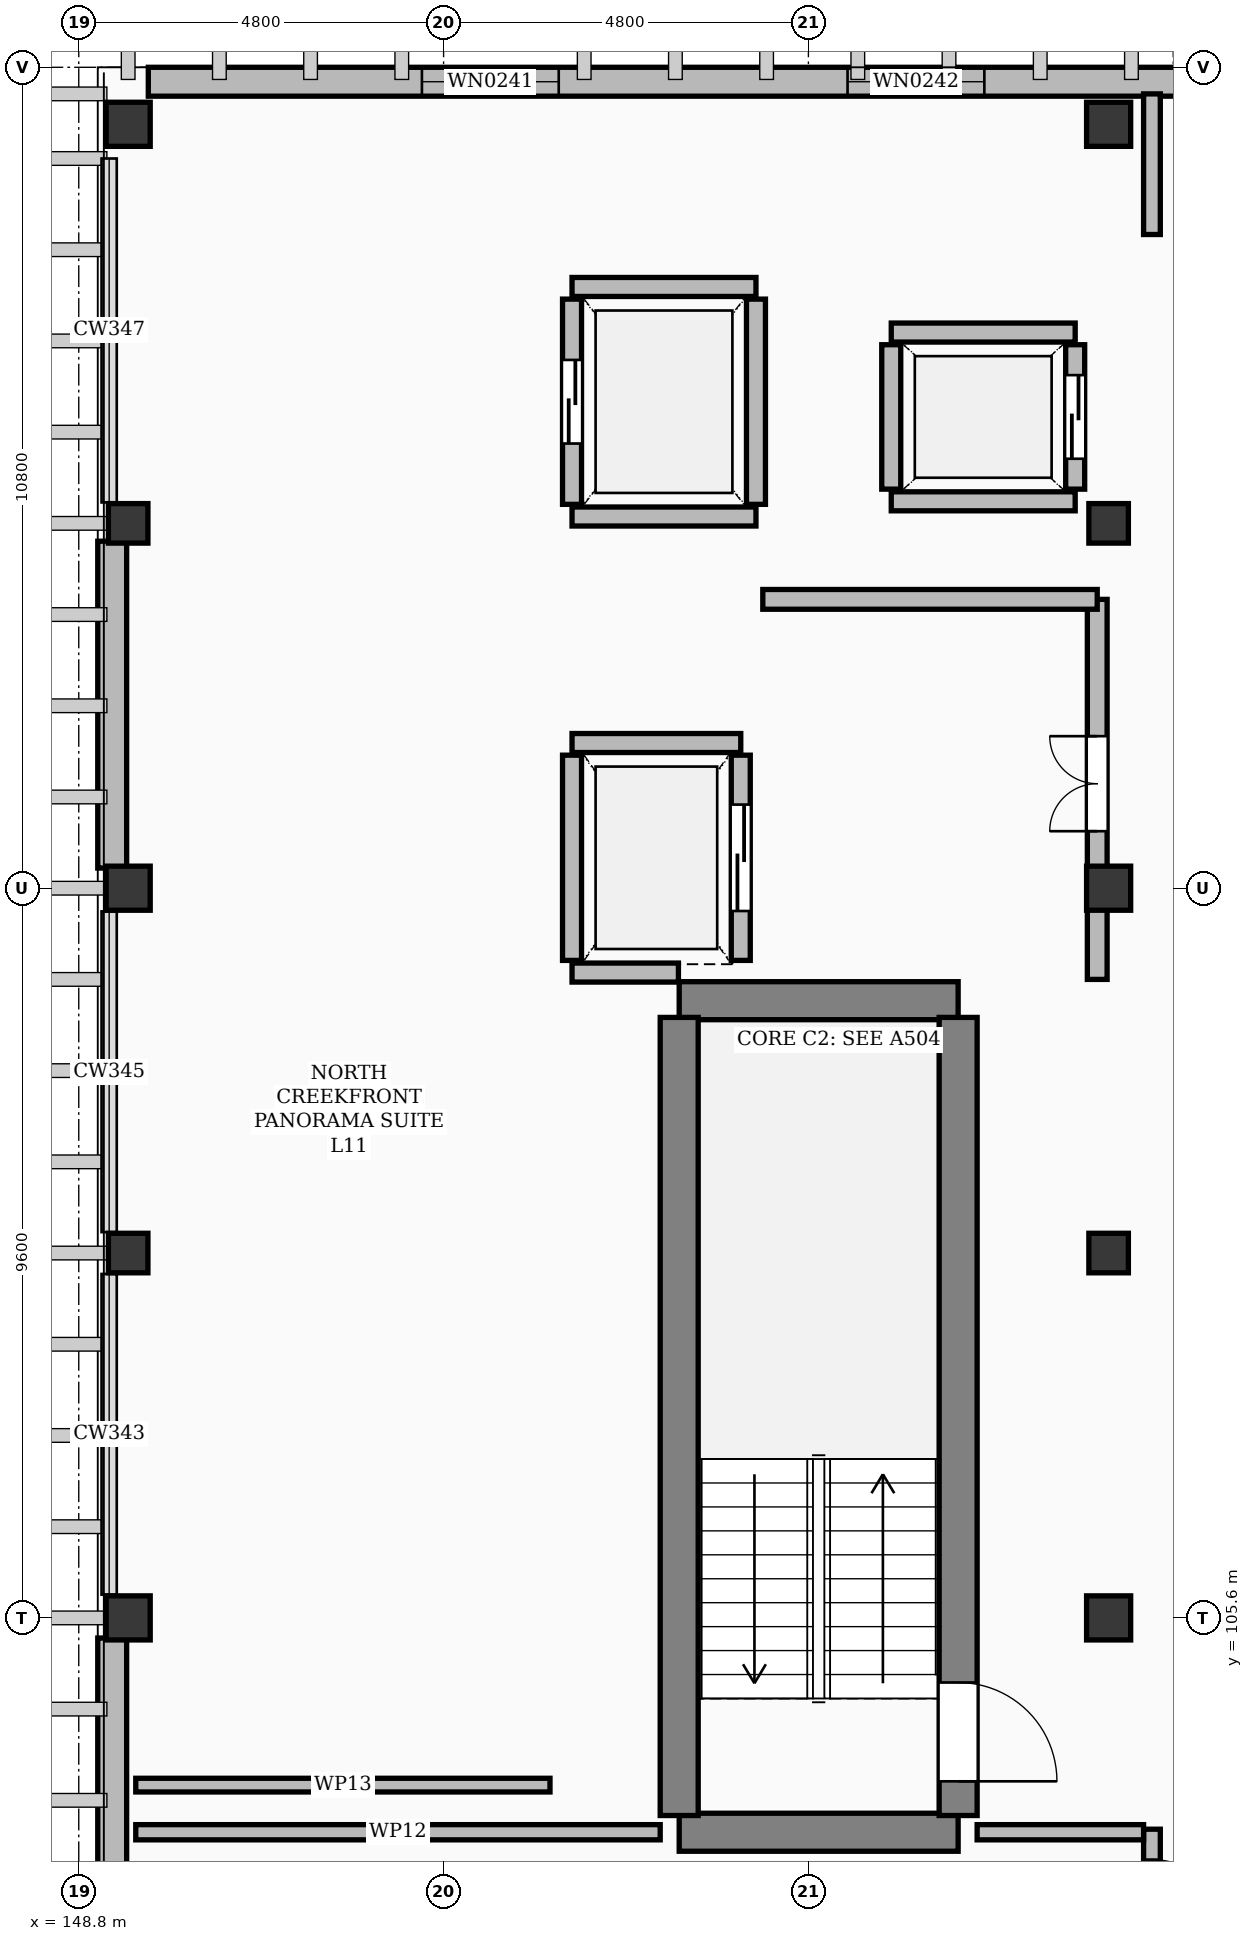
"""IFC4 building model, lengths in metres.
Left out: names, types, materials, properties, quantities, classifications, styles, units other than length and angle.
Written with IfcOpenShell. Run it as: python <this file> out.ifc"""

import sys

from ifc_helpers import new_model, si_unit, direction, frame, frame_2d, origin, origin_2d, place, context, subcontext, project, spatial, rectangle, extrude, element, fill, save


model = new_model("IFC4")
c1 = context("Model", 3, precision=1e-05, world=origin(), true_north=direction((0.0, 1.0)))
c2 = subcontext(c1, "Body", "Model", "MODEL_VIEW")
j1 = project(units=[si_unit("LENGTHUNIT", "METRE"), si_unit("PLANEANGLEUNIT", "RADIAN")], contexts=[c1])
p1 = place(None, origin())
s1 = spatial("IfcSite", under=j1, at=p1, CompositionType="ELEMENT")
p2 = place(p1, origin())
s2 = spatial("IfcBuilding", under=s1, at=p2, CompositionType="ELEMENT")
p3 = place(p2, frame((0.0, 0.0, 46.5)))
s3 = spatial("IfcBuildingStorey", under=s2, at=p3, CompositionType="ELEMENT", Elevation=46.5)
for number, where, z_axis, x_axis in (
    (1, (149.45, 105.6, 0.0), (0.0, 0.0, 1.0), (1.0, 0.0, 0.0)),
    (2, (149.45, 115.2, 0.0), (0.0, 0.0, 1.0), (1.0, 0.0, 0.0)),
    (3, (149.45, 125.25, 0.0), (0.0, 0.0, 1.0), (1.0, 0.0, 0.0)),
    (4, (162.35, 105.6, 0.0), (0.0, 0.0, 1.0), (1.0, 0.0, 0.0)),
    (5, (162.35, 115.2, 0.0), (0.0, 0.0, 1.0), (1.0, 0.0, 0.0)),
    (6, (162.35, 125.25, 0.0), (0.0, 0.0, 1.0), (1.0, 0.0, 0.0)),
):
    element("IfcColumn", number, at=place(p3, frame(where, z_axis=z_axis, x_axis=x_axis)), inside=s3, PredefinedType="COLUMN", context=c2, shape_type="SweptSolid", body=[
        extrude(rectangle(XDim=0.58, YDim=0.58, at=origin_2d()), origin(), (0.0, 0.0, 1.0), 3.9),
    ])
for number, where, z_axis, x_axis in (
    (7, (149.45, 110.4, 0.0), (0.0, 0.0, 1.0), (1.0, 0.0, 0.0)),
    (8, (149.45, 120.0, 0.0), (0.0, 0.0, 1.0), (1.0, 0.0, 0.0)),
    (9, (162.35, 110.4, 0.0), (0.0, 0.0, 1.0), (1.0, 0.0, 0.0)),
    (10, (162.35, 120.0, 0.0), (0.0, 0.0, 1.0), (1.0, 0.0, 0.0)),
):
    element("IfcColumn", number, at=place(p3, frame(where, z_axis=z_axis, x_axis=x_axis)), inside=s3, PredefinedType="COLUMN", context=c2, shape_type="SweptSolid", body=[
        extrude(rectangle(XDim=0.52, YDim=0.52, at=origin_2d()), origin(), (0.0, 0.0, 1.0), 3.9),
    ])
p4 = place(p3, frame((149.715, 125.81, 0.0), z_axis=(0.0, 0.0, 1.0), x_axis=(1.0, 0.0, 0.0)))
e11 = element("IfcWall", 11, at=p4, inside=s3, PredefinedType="SOLIDWALL", context=c2, shape_type="SweptSolid", body=[
    extrude(rectangle(XDim=29.37, YDim=0.38, at=frame_2d((14.685, 0.0))), origin(), (0.0, 0.0, 1.0), 3.68),
])
p5 = place(p4, frame((3.6, 0.0, 0.55)))
e12 = element("IfcOpeningElement", 12, at=p5, cuts=e11, PredefinedType="OPENING", context=c2, shape_type="SweptSolid", body=[
    extrude(rectangle(XDim=1.8, YDim=1.76, at=frame_2d((0.9, 0.88))), frame((0.0, 0.202, 0.0), z_axis=(0.0, -1.0, 0.0), x_axis=(1.0, 0.0, 0.0)), (0.0, 0.0, 1.0), 0.404),
])
p6 = place(p4, frame((9.2, 0.0, 0.55)))
e13 = element("IfcOpeningElement", 13, at=p6, cuts=e11, PredefinedType="OPENING", context=c2, shape_type="SweptSolid", body=[
    extrude(rectangle(XDim=1.8, YDim=1.76, at=frame_2d((0.9, 0.88))), frame((0.0, 0.202, 0.0), z_axis=(0.0, -1.0, 0.0), x_axis=(1.0, 0.0, 0.0)), (0.0, 0.0, 1.0), 0.404),
])
p7 = place(p4, frame((19.6, 0.0, 0.55)))
e14 = element("IfcOpeningElement", 14, at=p7, cuts=e11, PredefinedType="OPENING", context=c2, shape_type="SweptSolid", body=[
    extrude(rectangle(XDim=1.8, YDim=1.76, at=frame_2d((0.9, 0.88))), frame((0.0, 0.202, 0.0), z_axis=(0.0, -1.0, 0.0), x_axis=(1.0, 0.0, 0.0)), (0.0, 0.0, 1.0), 0.404),
])
p8 = place(p4, frame((25.2, 0.0, 0.55)))
e15 = element("IfcOpeningElement", 15, at=p8, cuts=e11, PredefinedType="OPENING", context=c2, shape_type="SweptSolid", body=[
    extrude(rectangle(XDim=1.8, YDim=1.76, at=frame_2d((0.9, 0.88))), frame((0.0, 0.202, 0.0), z_axis=(0.0, -1.0, 0.0), x_axis=(1.0, 0.0, 0.0)), (0.0, 0.0, 1.0), 0.404),
])
p9 = place(p3, frame((149.24, 101.035, 0.0), z_axis=(0.0, 0.0, 1.0), x_axis=(0.0, 1.0, 0.0)))
e16 = element("IfcWall", 16, at=p9, inside=s3, PredefinedType="SOLIDWALL", context=c2, shape_type="SweptSolid", body=[
    extrude(rectangle(XDim=4.3, YDim=0.38, at=frame_2d((2.15, 0.0))), origin(), (0.0, 0.0, 1.0), 3.072),
])
p10 = place(p3, frame((149.24, 115.465, 0.0), z_axis=(0.0, 0.0, 1.0), x_axis=(0.0, 1.0, 0.0)))
e17 = element("IfcWall", 17, at=p10, inside=s3, PredefinedType="SOLIDWALL", context=c2, shape_type="SweptSolid", body=[
    extrude(rectangle(XDim=4.3, YDim=0.38, at=frame_2d((2.15, 0.0))), origin(), (0.0, 0.0, 1.0), 3.072),
])
for number, where, z_axis, x_axis in (
    (18, (156.7, 102.78, 0.0), (0.0, 0.0, 1.0), (1.0, 0.0, 0.0)),
    (19, (156.7, 113.72, 0.0), (0.0, 0.0, 1.0), (1.0, 0.0, 0.0)),
):
    element("IfcWall", number, at=place(p3, frame(where, z_axis=z_axis, x_axis=x_axis)), inside=s3, PredefinedType="SHEAR", context=c2, shape_type="SweptSolid", body=[
        extrude(rectangle(XDim=3.67, YDim=0.5, at=frame_2d((1.835, 0.0))), origin(), (0.0, 0.0, 1.0), 3.68),
    ])
p11 = place(p3, frame((156.7, 103.0, 0.0), z_axis=(0.0, 0.0, 1.0), x_axis=(0.0, 1.0, 0.0)))
e20 = element("IfcWall", 20, at=p11, inside=s3, PredefinedType="SHEAR", context=c2, shape_type="SweptSolid", body=[
    extrude(rectangle(XDim=10.5, YDim=0.5, at=frame_2d((5.25, 0.0))), origin(), (0.0, 0.0, 1.0), 3.68),
])
p12 = place(p3, frame((160.37, 103.0, 0.0), z_axis=(0.0, 0.0, 1.0), x_axis=(0.0, 1.0, 0.0)))
e21 = element("IfcWall", 21, at=p12, inside=s3, PredefinedType="SHEAR", context=c2, shape_type="SweptSolid", body=[
    extrude(rectangle(XDim=10.5, YDim=0.5, at=frame_2d((5.25, 0.0))), origin(), (0.0, 0.0, 1.0), 3.68),
])
p13 = place(p12, frame((0.45, 0.0, 0.0)))
e22 = element("IfcOpeningElement", 22, at=p13, cuts=e21, PredefinedType="OPENING", context=c2, shape_type="SweptSolid", body=[
    extrude(rectangle(XDim=1.3, YDim=2.15, at=frame_2d((0.65, 1.075))), frame((0.0, 0.262, 0.0), z_axis=(0.0, -1.0, 0.0), x_axis=(1.0, 0.0, 0.0)), (0.0, 0.0, 1.0), 0.524),
])
p14 = place(p3, frame((155.29, 114.09, 0.0), z_axis=(0.0, 0.0, 1.0), x_axis=(1.0, 0.0, 0.0)))
e23 = element("IfcWall", 23, at=p14, inside=s3, PredefinedType="SOLIDWALL", context=c2, shape_type="SweptSolid", body=[
    extrude(rectangle(XDim=1.4, YDim=0.25, at=frame_2d((0.7, 0.0))), origin(), (0.0, 0.0, 1.0), 3.68),
])
p15 = place(p3, frame((155.29, 117.11, 0.0), z_axis=(0.0, 0.0, 1.0), x_axis=(1.0, 0.0, 0.0)))
e24 = element("IfcWall", 24, at=p15, inside=s3, PredefinedType="SOLIDWALL", context=c2, shape_type="SweptSolid", body=[
    extrude(rectangle(XDim=2.22, YDim=0.25, at=frame_2d((1.11, 0.0))), origin(), (0.0, 0.0, 1.0), 3.68),
])
p16 = place(p3, frame((155.29, 114.25, 0.0), z_axis=(0.0, 0.0, 1.0), x_axis=(0.0, 1.0, 0.0)))
e25 = element("IfcWall", 25, at=p16, inside=s3, PredefinedType="SOLIDWALL", context=c2, shape_type="SweptSolid", body=[
    extrude(rectangle(XDim=2.7, YDim=0.25, at=frame_2d((1.35, 0.0))), origin(), (0.0, 0.0, 1.0), 3.072),
])
p17 = place(p3, frame((157.51, 114.25, 0.0), z_axis=(0.0, 0.0, 1.0), x_axis=(0.0, 1.0, 0.0)))
e26 = element("IfcWall", 26, at=p17, inside=s3, PredefinedType="SOLIDWALL", context=c2, shape_type="SweptSolid", body=[
    extrude(rectangle(XDim=2.7, YDim=0.25, at=frame_2d((1.35, 0.0))), origin(), (0.0, 0.0, 1.0), 3.072),
])
p18 = place(p17, frame((0.65, 0.0, 0.0)))
e27 = element("IfcOpeningElement", 27, at=p18, cuts=e26, PredefinedType="OPENING", context=c2, shape_type="SweptSolid", body=[
    extrude(rectangle(XDim=1.4, YDim=2.3, at=frame_2d((0.7, 1.15))), frame((0.0, 0.137, 0.0), z_axis=(0.0, -1.0, 0.0), x_axis=(1.0, 0.0, 0.0)), (0.0, 0.0, 1.0), 0.274),
])
p19 = place(p3, frame((159.49, 120.29, 0.0), z_axis=(0.0, 0.0, 1.0), x_axis=(1.0, 0.0, 0.0)))
e28 = element("IfcWall", 28, at=p19, inside=s3, PredefinedType="SOLIDWALL", context=c2, shape_type="SweptSolid", body=[
    extrude(rectangle(XDim=2.42, YDim=0.25, at=frame_2d((1.21, 0.0))), origin(), (0.0, 0.0, 1.0), 3.072),
])
p20 = place(p3, frame((159.49, 122.51, 0.0), z_axis=(0.0, 0.0, 1.0), x_axis=(1.0, 0.0, 0.0)))
e29 = element("IfcWall", 29, at=p20, inside=s3, PredefinedType="SOLIDWALL", context=c2, shape_type="SweptSolid", body=[
    extrude(rectangle(XDim=2.42, YDim=0.25, at=frame_2d((1.21, 0.0))), origin(), (0.0, 0.0, 1.0), 3.68),
])
p21 = place(p3, frame((159.49, 120.45, 0.0), z_axis=(0.0, 0.0, 1.0), x_axis=(0.0, 1.0, 0.0)))
e30 = element("IfcWall", 30, at=p21, inside=s3, PredefinedType="SOLIDWALL", context=c2, shape_type="SweptSolid", body=[
    extrude(rectangle(XDim=1.9, YDim=0.25, at=frame_2d((0.95, 0.0))), origin(), (0.0, 0.0, 1.0), 3.68),
])
p22 = place(p3, frame((161.91, 120.45, 0.0), z_axis=(0.0, 0.0, 1.0), x_axis=(0.0, 1.0, 0.0)))
e31 = element("IfcWall", 31, at=p22, inside=s3, PredefinedType="SOLIDWALL", context=c2, shape_type="SweptSolid", body=[
    extrude(rectangle(XDim=1.9, YDim=0.25, at=frame_2d((0.95, 0.0))), origin(), (0.0, 0.0, 1.0), 3.68),
])
p23 = place(p22, frame((0.4, 0.0, 0.0)))
e32 = element("IfcOpeningElement", 32, at=p23, cuts=e31, PredefinedType="OPENING", context=c2, shape_type="SweptSolid", body=[
    extrude(rectangle(XDim=1.1, YDim=2.2, at=frame_2d((0.55, 1.1))), frame((0.0, 0.137, 0.0), z_axis=(0.0, -1.0, 0.0), x_axis=(1.0, 0.0, 0.0)), (0.0, 0.0, 1.0), 0.274),
])
p24 = place(p3, frame((155.29, 120.09, 0.0), z_axis=(0.0, 0.0, 1.0), x_axis=(1.0, 0.0, 0.0)))
e33 = element("IfcWall", 33, at=p24, inside=s3, PredefinedType="SOLIDWALL", context=c2, shape_type="SweptSolid", body=[
    extrude(rectangle(XDim=2.42, YDim=0.25, at=frame_2d((1.21, 0.0))), origin(), (0.0, 0.0, 1.0), 3.072),
])
p25 = place(p3, frame((155.29, 123.11, 0.0), z_axis=(0.0, 0.0, 1.0), x_axis=(1.0, 0.0, 0.0)))
e34 = element("IfcWall", 34, at=p25, inside=s3, PredefinedType="SOLIDWALL", context=c2, shape_type="SweptSolid", body=[
    extrude(rectangle(XDim=2.42, YDim=0.25, at=frame_2d((1.21, 0.0))), origin(), (0.0, 0.0, 1.0), 3.68),
])
p26 = place(p3, frame((155.29, 120.25, 0.0), z_axis=(0.0, 0.0, 1.0), x_axis=(0.0, 1.0, 0.0)))
e35 = element("IfcWall", 35, at=p26, inside=s3, PredefinedType="SOLIDWALL", context=c2, shape_type="SweptSolid", body=[
    extrude(rectangle(XDim=2.7, YDim=0.25, at=frame_2d((1.35, 0.0))), origin(), (0.0, 0.0, 1.0), 3.072),
])
p27 = place(p26, frame((0.8, 0.0, 0.0)))
e36 = element("IfcOpeningElement", 36, at=p27, cuts=e35, PredefinedType="OPENING", context=c2, shape_type="SweptSolid", body=[
    extrude(rectangle(XDim=1.1, YDim=2.2, at=frame_2d((0.55, 1.1))), frame((0.0, 0.137, 0.0), z_axis=(0.0, -1.0, 0.0), x_axis=(1.0, 0.0, 0.0)), (0.0, 0.0, 1.0), 0.274),
])
p28 = place(p3, frame((157.71, 120.25, 0.0), z_axis=(0.0, 0.0, 1.0), x_axis=(0.0, 1.0, 0.0)))
e37 = element("IfcWall", 37, at=p28, inside=s3, PredefinedType="SOLIDWALL", context=c2, shape_type="SweptSolid", body=[
    extrude(rectangle(XDim=2.7, YDim=0.25, at=frame_2d((1.35, 0.0))), origin(), (0.0, 0.0, 1.0), 3.072),
])
p29 = place(p3, frame((162.2, 114.0, 0.0), z_axis=(0.0, 0.0, 1.0), x_axis=(0.0, 1.0, 0.0)))
e38 = element("IfcWall", 38, at=p29, inside=s3, PredefinedType="SOLIDWALL", context=c2, shape_type="SweptSolid", body=[
    extrude(rectangle(XDim=5.0, YDim=0.26, at=frame_2d((2.5, 0.0))), origin(), (0.0, 0.0, 1.0), 3.072),
])
p30 = place(p29, frame((1.95, 0.0, 0.0)))
e39 = element("IfcOpeningElement", 39, at=p30, cuts=e38, PredefinedType="OPENING", context=c2, shape_type="SweptSolid", body=[
    extrude(rectangle(XDim=1.25, YDim=2.15, at=frame_2d((0.625, 1.075))), frame((0.0, 0.142, 0.0), z_axis=(0.0, -1.0, 0.0), x_axis=(1.0, 0.0, 0.0)), (0.0, 0.0, 1.0), 0.284),
])
p31 = place(p3, frame((157.8, 119.0, 0.0), z_axis=(0.0, 0.0, 1.0), x_axis=(1.0, 0.0, 0.0)))
e40 = element("IfcWall", 40, at=p31, inside=s3, PredefinedType="SOLIDWALL", context=c2, shape_type="SweptSolid", body=[
    extrude(rectangle(XDim=4.4, YDim=0.26, at=frame_2d((2.2, 0.0))), origin(), (0.0, 0.0, 1.0), 3.072),
])
p32 = place(p3, frame((162.92, 95.6, 0.0), z_axis=(0.0, 0.0, 1.0), x_axis=(0.0, 1.0, 0.0)))
e41 = element("IfcWall", 41, at=p32, inside=s3, PredefinedType="PARTITIONING", context=c2, shape_type="SweptSolid", body=[
    extrude(rectangle(XDim=7.22, YDim=0.22, at=frame_2d((3.61, 0.0))), origin(), (0.0, 0.0, 1.0), 3.072),
])
p33 = place(p32, frame((2.05, 0.0, 0.0)))
e42 = element("IfcOpeningElement", 42, at=p33, cuts=e41, PredefinedType="OPENING", context=c2, shape_type="SweptSolid", body=[
    extrude(rectangle(XDim=1.28, YDim=2.16, at=frame_2d((0.64, 1.08))), frame((0.0, 0.122, 0.0), z_axis=(0.0, -1.0, 0.0), x_axis=(1.0, 0.0, 0.0)), (0.0, 0.0, 1.0), 0.244),
])
p34 = place(p32, frame((5.8, 0.0, 0.0)))
e43 = element("IfcOpeningElement", 43, at=p34, cuts=e41, PredefinedType="OPENING", context=c2, shape_type="SweptSolid", body=[
    extrude(rectangle(XDim=1.02, YDim=2.2, at=frame_2d((0.51, 1.1))), frame((0.0, 0.122, 0.0), z_axis=(0.0, -1.0, 0.0), x_axis=(1.0, 0.0, 0.0)), (0.0, 0.0, 1.0), 0.244),
])
p35 = place(p3, frame((162.92, 123.8, 0.0), z_axis=(0.0, 0.0, 1.0), x_axis=(0.0, 1.0, 0.0)))
e44 = element("IfcWall", 44, at=p35, inside=s3, PredefinedType="PARTITIONING", context=c2, shape_type="SweptSolid", body=[
    extrude(rectangle(XDim=1.85, YDim=0.22, at=frame_2d((0.925, 0.0))), origin(), (0.0, 0.0, 1.0), 2.922),
])
p36 = place(p3, frame((149.55, 102.78, 0.0), z_axis=(0.0, 0.0, 1.0), x_axis=(1.0, 0.0, 0.0)))
e45 = element("IfcWall", 45, at=p36, inside=s3, PredefinedType="PARTITIONING", context=c2, shape_type="SweptSolid", body=[
    extrude(rectangle(XDim=6.9, YDim=0.2, at=frame_2d((3.45, 0.0))), origin(), (0.0, 0.0, 1.0), 3.68),
])
p37 = place(p3, frame((160.62, 102.78, 0.0), z_axis=(0.0, 0.0, 1.0), x_axis=(1.0, 0.0, 0.0)))
e46 = element("IfcWall", 46, at=p37, inside=s3, PredefinedType="PARTITIONING", context=c2, shape_type="SweptSolid", body=[
    extrude(rectangle(XDim=2.19, YDim=0.2, at=frame_2d((1.095, 0.0))), origin(), (0.0, 0.0, 1.0), 3.072),
])
p38 = place(p3, frame((149.55, 103.4, 0.0), z_axis=(0.0, 0.0, 1.0), x_axis=(1.0, 0.0, 0.0)))
e47 = element("IfcWall", 47, at=p38, inside=s3, PredefinedType="PARTITIONING", context=c2, shape_type="SweptSolid", body=[
    extrude(rectangle(XDim=5.45, YDim=0.18, at=frame_2d((2.725, 0.0))), origin(), (0.0, 0.0, 1.0), 3.68),
])
p39 = place(p5, origin())
e48 = element("IfcWindow", 48, at=p39, inside=s3, PartitioningType="SINGLE_PANEL", PredefinedType="WINDOW", context=c2, shape_type="SweptSolid", body=[
    extrude(rectangle(XDim=1.8, YDim=1.76, at=frame_2d((0.9, 0.88))), frame((0.0, 0.03, 0.0), z_axis=(0.0, -1.0, 0.0), x_axis=(1.0, 0.0, 0.0)), (0.0, 0.0, 1.0), 0.06),
])
fill(e12, e48)
p40 = place(p6, origin())
e49 = element("IfcWindow", 49, at=p40, inside=s3, PartitioningType="SINGLE_PANEL", PredefinedType="WINDOW", context=c2, shape_type="SweptSolid", body=[
    extrude(rectangle(XDim=1.8, YDim=1.76, at=frame_2d((0.9, 0.88))), frame((0.0, 0.03, 0.0), z_axis=(0.0, -1.0, 0.0), x_axis=(1.0, 0.0, 0.0)), (0.0, 0.0, 1.0), 0.06),
])
fill(e13, e49)
p41 = place(p13, frame((1.3, 0.0, 0.0), z_axis=(0.0, 0.0, 1.0), x_axis=(-1.0, 0.0, 0.0)))
e50 = element("IfcDoor", 50, at=p41, inside=s3, OperationType="SINGLE_SWING_LEFT", PredefinedType="DOOR", context=c2, shape_type="SweptSolid", body=[
    extrude(rectangle(XDim=1.3, YDim=2.15, at=frame_2d((0.65, 1.075))), frame((0.0, 0.025, 0.0), z_axis=(0.0, -1.0, 0.0), x_axis=(1.0, 0.0, 0.0)), (0.0, 0.0, 1.0), 0.05),
])
fill(e22, e50)
p42 = place(p18, origin())
e51 = element("IfcDoor", 51, at=p42, inside=s3, OperationType="SLIDING_TO_LEFT", PredefinedType="DOOR", context=c2, shape_type="SweptSolid", body=[
    extrude(rectangle(XDim=1.4, YDim=2.3, at=frame_2d((0.7, 1.15))), frame((0.0, 0.025, 0.0), z_axis=(0.0, -1.0, 0.0), x_axis=(1.0, 0.0, 0.0)), (0.0, 0.0, 1.0), 0.05),
])
fill(e27, e51)
p43 = place(p23, origin())
e52 = element("IfcDoor", 52, at=p43, inside=s3, OperationType="SLIDING_TO_LEFT", PredefinedType="DOOR", context=c2, shape_type="SweptSolid", body=[
    extrude(rectangle(XDim=1.1, YDim=2.2, at=frame_2d((0.55, 1.1))), frame((0.0, 0.025, 0.0), z_axis=(0.0, -1.0, 0.0), x_axis=(1.0, 0.0, 0.0)), (0.0, 0.0, 1.0), 0.05),
])
fill(e32, e52)
p44 = place(p27, origin())
e53 = element("IfcDoor", 53, at=p44, inside=s3, OperationType="SLIDING_TO_LEFT", PredefinedType="DOOR", context=c2, shape_type="SweptSolid", body=[
    extrude(rectangle(XDim=1.1, YDim=2.2, at=frame_2d((0.55, 1.1))), frame((0.0, 0.025, 0.0), z_axis=(0.0, -1.0, 0.0), x_axis=(1.0, 0.0, 0.0)), (0.0, 0.0, 1.0), 0.05),
])
fill(e36, e53)
p45 = place(p30, origin())
e54 = element("IfcDoor", 54, at=p45, inside=s3, OperationType="DOUBLE_DOOR_SINGLE_SWING", PredefinedType="DOOR", context=c2, shape_type="SweptSolid", body=[
    extrude(rectangle(XDim=1.25, YDim=2.15, at=frame_2d((0.625, 1.075))), frame((0.0, 0.025, 0.0), z_axis=(0.0, -1.0, 0.0), x_axis=(1.0, 0.0, 0.0)), (0.0, 0.0, 1.0), 0.05),
])
fill(e39, e54)
p46 = place(p34, frame((1.02, 0.0, 0.0), z_axis=(0.0, 0.0, 1.0), x_axis=(-1.0, 0.0, 0.0)))
e55 = element("IfcDoor", 55, at=p46, inside=s3, OperationType="SINGLE_SWING_LEFT", PredefinedType="DOOR", context=c2, shape_type="SweptSolid", body=[
    extrude(rectangle(XDim=1.02, YDim=2.2, at=frame_2d((0.51, 1.1))), frame((0.0, 0.025, 0.0), z_axis=(0.0, -1.0, 0.0), x_axis=(1.0, 0.0, 0.0)), (0.0, 0.0, 1.0), 0.05),
])
fill(e43, e55)
save(model, sys.argv[1])
